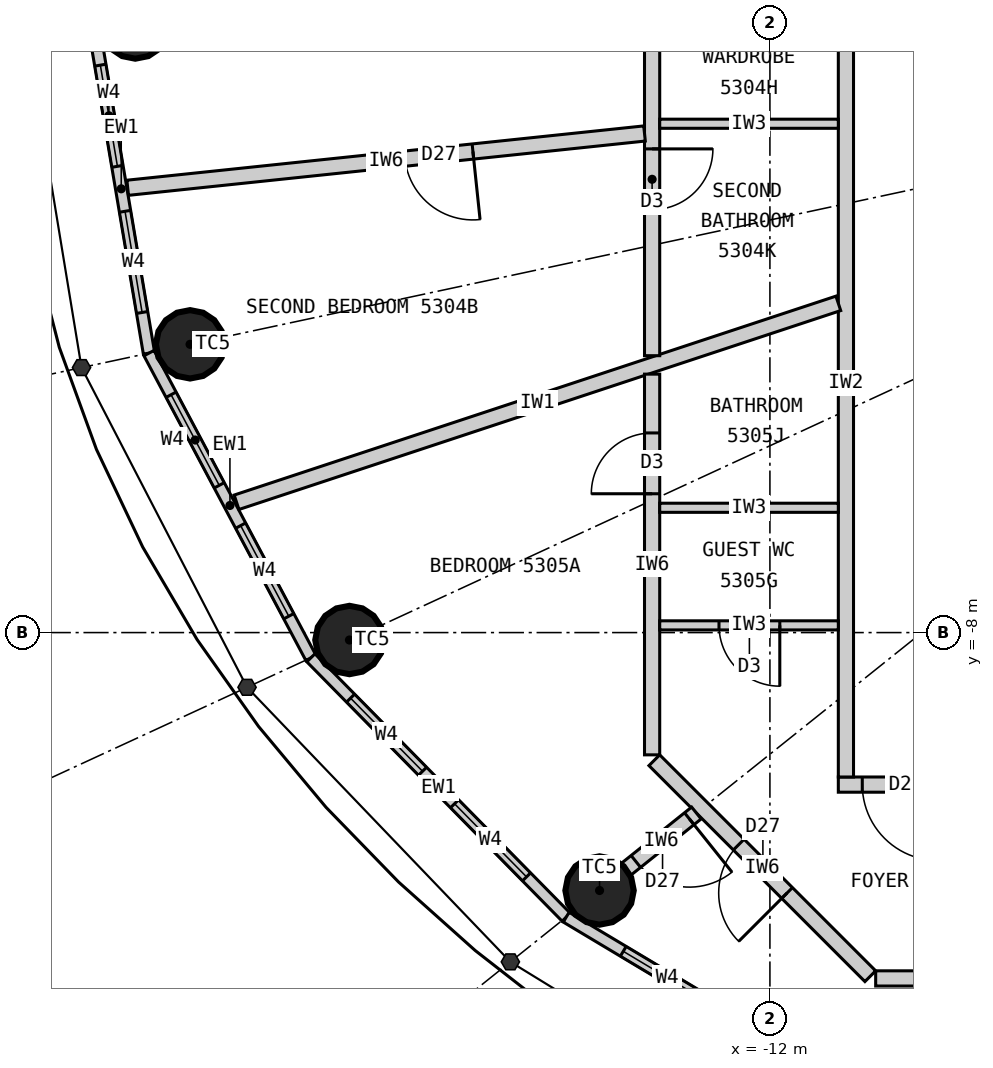
"""IFC4 building model, lengths in metres.
Left out: names, types, materials, properties, quantities, classifications, styles, units other than length and angle.
Written with IfcOpenShell. Run it as: python <this file> out.ifc"""

import sys

from ifc_helpers import new_model, si_unit, direction, frame, frame_2d, origin, origin_2d, place, context, subcontext, project, spatial, rectangle, circle, extrude, element, fill, save


model = new_model("IFC4")
c1 = context("Model", 3, precision=1e-05, world=origin(), true_north=direction((0.0, 1.0)))
c2 = subcontext(c1, "Body", "Model", "MODEL_VIEW")
j1 = project(units=[si_unit("LENGTHUNIT", "METRE"), si_unit("PLANEANGLEUNIT", "RADIAN")], contexts=[c1])
p1 = place(None, origin())
s1 = spatial("IfcSite", under=j1, at=p1, CompositionType="ELEMENT")
p2 = place(p1, origin())
s2 = spatial("IfcBuilding", under=s1, at=p2, CompositionType="ELEMENT")
p3 = place(p2, frame((0.0, 0.0, 199.5)))
s3 = spatial("IfcBuildingStorey", under=s2, at=p3, CompositionType="ELEMENT", Elevation=199.5)
for number, where, z_axis, x_axis in (
    (1, (-20.35, 0.0, 0.0), (0.0, 0.0, 1.0), (1.0, 0.0, 0.0)),
    (2, (-19.629, -4.208, 0.0), (0.0, 0.0, 1.0), (1.0, 0.0, 0.0)),
    (3, (-17.532, -8.098, 0.0), (0.0, 0.0, 1.0), (1.0, 0.0, 0.0)),
    (4, (-14.241, -11.393, 0.0), (0.0, 0.0, 1.0), (1.0, 0.0, 0.0)),
):
    element("IfcColumn", number, at=place(p3, frame(where, z_axis=z_axis, x_axis=x_axis)), inside=s3, PredefinedType="COLUMN", context=c2, shape_type="SweptSolid", body=[
        extrude(circle(Radius=0.45, at=origin_2d()), origin(), (0.0, 0.0, 1.0), 3.3),
    ])
p4 = place(p3, frame((-20.9, 0.0, 0.0), z_axis=(0.0, 0.0, 1.0), x_axis=(0.166538513568, -0.986034950445, 0.0)))
e5 = element("IfcWall", 5, at=p4, inside=s3, PredefinedType="ELEMENTEDWALL", context=c2, shape_type="SweptSolid", body=[
    extrude(rectangle(XDim=4.385, YDim=0.15, at=frame_2d((2.192, 0.0))), origin(), (0.0, 0.0, 1.0), 3.12),
])
p5 = place(p4, frame((0.542, 0.0, 0.9)))
e6 = element("IfcOpeningElement", 6, at=p5, cuts=e5, PredefinedType="OPENING", context=c2, shape_type="SweptSolid", body=[
    extrude(rectangle(XDim=1.35, YDim=1.9, at=frame_2d((0.675, 0.95))), frame((0.0, 0.085, 0.0), z_axis=(0.0, -1.0, 0.0), x_axis=(1.0, 0.0, 0.0)), (0.0, 0.0, 1.0), 0.17),
])
p6 = place(p4, frame((2.492, 0.0, 0.9)))
e7 = element("IfcOpeningElement", 7, at=p6, cuts=e5, PredefinedType="OPENING", context=c2, shape_type="SweptSolid", body=[
    extrude(rectangle(XDim=1.35, YDim=1.9, at=frame_2d((0.675, 0.95))), frame((0.0, 0.085, 0.0), z_axis=(0.0, -1.0, 0.0), x_axis=(1.0, 0.0, 0.0)), (0.0, 0.0, 1.0), 0.17),
])
p7 = place(p3, frame((-20.17, -4.323, 0.0), z_axis=(0.0, 0.0, 1.0), x_axis=(0.469256152955, -0.883062094597, 0.0)))
e8 = element("IfcWall", 8, at=p7, inside=s3, PredefinedType="ELEMENTEDWALL", context=c2, shape_type="SweptSolid", body=[
    extrude(rectangle(XDim=4.539, YDim=0.15, at=frame_2d((2.27, 0.0))), origin(), (0.0, 0.0, 1.0), 3.12),
])
p8 = place(p7, frame((0.62, 0.0, 0.9)))
e9 = element("IfcOpeningElement", 9, at=p8, cuts=e8, PredefinedType="OPENING", context=c2, shape_type="SweptSolid", body=[
    extrude(rectangle(XDim=1.35, YDim=1.9, at=frame_2d((0.675, 0.95))), frame((0.0, 0.085, 0.0), z_axis=(0.0, -1.0, 0.0), x_axis=(1.0, 0.0, 0.0)), (0.0, 0.0, 1.0), 0.17),
])
p9 = place(p7, frame((2.57, 0.0, 0.9)))
e10 = element("IfcOpeningElement", 10, at=p9, cuts=e8, PredefinedType="OPENING", context=c2, shape_type="SweptSolid", body=[
    extrude(rectangle(XDim=1.35, YDim=1.9, at=frame_2d((0.675, 0.95))), frame((0.0, 0.085, 0.0), z_axis=(0.0, -1.0, 0.0), x_axis=(1.0, 0.0, 0.0)), (0.0, 0.0, 1.0), 0.17),
])
p10 = place(p3, frame((-18.04, -8.332, 0.0), z_axis=(0.0, 0.0, 1.0), x_axis=(0.701527379618, -0.712642501993, 0.0)))
e11 = element("IfcWall", 11, at=p10, inside=s3, PredefinedType="ELEMENTEDWALL", context=c2, shape_type="SweptSolid", body=[
    extrude(rectangle(XDim=4.788, YDim=0.15, at=frame_2d((2.394, 0.0))), origin(), (0.0, 0.0, 1.0), 3.12),
])
p11 = place(p10, frame((0.744, 0.0, 0.9)))
e12 = element("IfcOpeningElement", 12, at=p11, cuts=e11, PredefinedType="OPENING", context=c2, shape_type="SweptSolid", body=[
    extrude(rectangle(XDim=1.35, YDim=1.9, at=frame_2d((0.675, 0.95))), frame((0.0, 0.085, 0.0), z_axis=(0.0, -1.0, 0.0), x_axis=(1.0, 0.0, 0.0)), (0.0, 0.0, 1.0), 0.17),
])
p12 = place(p10, frame((2.694, 0.0, 0.9)))
e13 = element("IfcOpeningElement", 13, at=p12, cuts=e11, PredefinedType="OPENING", context=c2, shape_type="SweptSolid", body=[
    extrude(rectangle(XDim=1.35, YDim=1.9, at=frame_2d((0.675, 0.95))), frame((0.0, 0.085, 0.0), z_axis=(0.0, -1.0, 0.0), x_axis=(1.0, 0.0, 0.0)), (0.0, 0.0, 1.0), 0.17),
])
p13 = place(p3, frame((-14.68, -11.744, 0.0), z_axis=(0.0, 0.0, 1.0), x_axis=(0.85822150553, -0.513279502265, 0.0)))
e14 = element("IfcWall", 14, at=p13, inside=s3, PredefinedType="ELEMENTEDWALL", context=c2, shape_type="SweptSolid", body=[
    extrude(rectangle(XDim=5.05, YDim=0.15, at=frame_2d((2.525, 0.0))), origin(), (0.0, 0.0, 1.0), 3.12),
])
p14 = place(p13, frame((0.875, 0.0, 0.9)))
e15 = element("IfcOpeningElement", 15, at=p14, cuts=e14, PredefinedType="OPENING", context=c2, shape_type="SweptSolid", body=[
    extrude(rectangle(XDim=1.35, YDim=1.9, at=frame_2d((0.675, 0.95))), frame((0.0, 0.085, 0.0), z_axis=(0.0, -1.0, 0.0), x_axis=(1.0, 0.0, 0.0)), (0.0, 0.0, 1.0), 0.17),
])
p15 = place(p13, frame((2.825, 0.0, 0.9)))
e16 = element("IfcOpeningElement", 16, at=p15, cuts=e14, PredefinedType="OPENING", context=c2, shape_type="SweptSolid", body=[
    extrude(rectangle(XDim=1.35, YDim=1.9, at=frame_2d((0.675, 0.95))), frame((0.0, 0.085, 0.0), z_axis=(0.0, -1.0, 0.0), x_axis=(1.0, 0.0, 0.0)), (0.0, 0.0, 1.0), 0.17),
])
p16 = place(p3, frame((-3.579, -10.0, 0.0), z_axis=(0.0, 0.0, 1.0), x_axis=(-1.0, 0.0, 0.0)))
e17 = element("IfcWall", 17, at=p16, inside=s3, PredefinedType="PARTITIONING", context=c2, shape_type="SweptSolid", body=[
    extrude(rectangle(XDim=7.521, YDim=0.2, at=frame_2d((3.761, 0.0))), origin(), (0.0, 0.0, 1.0), 3.12),
])
p17 = place(p16, frame((6.206, 0.0, 0.0)))
e18 = element("IfcOpeningElement", 18, at=p17, cuts=e17, PredefinedType="OPENING", context=c2, shape_type="SweptSolid", body=[
    extrude(rectangle(XDim=1.0, YDim=2.2, at=frame_2d((0.5, 1.1))), frame((0.0, 0.11, 0.0), z_axis=(0.0, -1.0, 0.0), x_axis=(1.0, 0.0, 0.0)), (0.0, 0.0, 1.0), 0.22),
])
p18 = place(p3, frame((-11.0, 0.464, 0.0), z_axis=(0.0, 0.0, 1.0), x_axis=(0.0, -1.0, 0.0)))
e19 = element("IfcWall", 19, at=p18, inside=s3, PredefinedType="PARTITIONING", context=c2, shape_type="SweptSolid", body=[
    extrude(rectangle(XDim=10.364, YDim=0.2, at=frame_2d((5.182, 0.0))), origin(), (0.0, 0.0, 1.0), 3.12),
])
p19 = place(p3, frame((-11.1, -3.669, 0.0), z_axis=(0.0, 0.0, 1.0), x_axis=(-0.949476668397, -0.313837627079, 0.0)))
e20 = element("IfcWall", 20, at=p19, inside=s3, PredefinedType="PARTITIONING", context=c2, shape_type="SweptSolid", body=[
    extrude(rectangle(XDim=8.339, YDim=0.2, at=frame_2d((4.169, 0.0))), origin(), (0.0, 0.0, 1.0), 3.12),
])
p20 = place(p3, frame((-13.55, 8.139, 0.0), z_axis=(0.0, 0.0, 1.0), x_axis=(0.0, -1.0, 0.0)))
e21 = element("IfcWall", 21, at=p20, inside=s3, PredefinedType="PARTITIONING", context=c2, shape_type="SweptSolid", body=[
    extrude(rectangle(XDim=12.496, YDim=0.2, at=frame_2d((6.248, 0.0))), origin(), (0.0, 0.0, 1.0), 3.12),
])
p21 = place(p20, frame((2.42, 0.0, 0.0)))
e22 = element("IfcOpeningElement", 22, at=p21, cuts=e21, PredefinedType="OPENING", context=c2, shape_type="SweptSolid", body=[
    extrude(rectangle(XDim=0.8, YDim=2.1, at=frame_2d((0.4, 1.05))), frame((0.0, 0.11, 0.0), z_axis=(0.0, -1.0, 0.0), x_axis=(1.0, 0.0, 0.0)), (0.0, 0.0, 1.0), 0.22),
])
p22 = place(p20, frame((9.776, 0.0, 0.0)))
e23 = element("IfcOpeningElement", 23, at=p22, cuts=e21, PredefinedType="OPENING", context=c2, shape_type="SweptSolid", body=[
    extrude(rectangle(XDim=0.8, YDim=2.1, at=frame_2d((0.4, 1.05))), frame((0.0, 0.11, 0.0), z_axis=(0.0, -1.0, 0.0), x_axis=(1.0, 0.0, 0.0)), (0.0, 0.0, 1.0), 0.22),
])
p23 = place(p20, frame((5.82, 0.0, 0.0)))
e24 = element("IfcOpeningElement", 24, at=p23, cuts=e21, PredefinedType="OPENING", context=c2, shape_type="SweptSolid", body=[
    extrude(rectangle(XDim=0.9, YDim=2.1, at=frame_2d((0.45, 1.05))), frame((0.0, 0.11, 0.0), z_axis=(0.0, -1.0, 0.0), x_axis=(1.0, 0.0, 0.0)), (0.0, 0.0, 1.0), 0.22),
])
p24 = place(p3, frame((-13.65, -1.434, 0.0), z_axis=(0.0, 0.0, 1.0), x_axis=(-0.994526954268, -0.10448031984, 0.0)))
e25 = element("IfcWall", 25, at=p24, inside=s3, PredefinedType="PARTITIONING", context=c2, shape_type="SweptSolid", body=[
    extrude(rectangle(XDim=6.837, YDim=0.2, at=frame_2d((3.418, 0.0))), origin(), (0.0, 0.0, 1.0), 2.47),
])
p25 = place(p24, frame((2.27, 0.0, 0.0)))
e26 = element("IfcOpeningElement", 26, at=p25, cuts=e25, PredefinedType="OPENING", context=c2, shape_type="SweptSolid", body=[
    extrude(rectangle(XDim=0.9, YDim=2.1, at=frame_2d((0.45, 1.05))), frame((0.0, 0.11, 0.0), z_axis=(0.0, -1.0, 0.0), x_axis=(1.0, 0.0, 0.0)), (0.0, 0.0, 1.0), 0.22),
])
p26 = place(p3, frame((-11.1, -1.306, 0.0), z_axis=(0.0, 0.0, 1.0), x_axis=(-1.0, 0.0, 0.0)))
e27 = element("IfcWall", 27, at=p26, inside=s3, PredefinedType="PARTITIONING", context=c2, shape_type="SweptSolid", body=[
    extrude(rectangle(XDim=2.35, YDim=0.12, at=frame_2d((1.175, 0.0))), origin(), (0.0, 0.0, 1.0), 3.12),
])
p27 = place(p3, frame((-13.55, -4.6, 0.0), z_axis=(0.0, 0.0, 1.0), x_axis=(0.0, -1.0, 0.0)))
e28 = element("IfcWall", 28, at=p27, inside=s3, PredefinedType="PARTITIONING", context=c2, shape_type="SweptSolid", body=[
    extrude(rectangle(XDim=5.009, YDim=0.2, at=frame_2d((2.504, 0.0))), origin(), (0.0, 0.0, 1.0), 3.12),
])
p28 = place(p27, frame((0.774, 0.0, 0.0)))
e29 = element("IfcOpeningElement", 29, at=p28, cuts=e28, PredefinedType="OPENING", context=c2, shape_type="SweptSolid", body=[
    extrude(rectangle(XDim=0.8, YDim=2.1, at=frame_2d((0.4, 1.05))), frame((0.0, 0.11, 0.0), z_axis=(0.0, -1.0, 0.0), x_axis=(1.0, 0.0, 0.0)), (0.0, 0.0, 1.0), 0.22),
])
p29 = place(p3, frame((-13.521, -9.679, 0.0), z_axis=(0.0, 0.0, 1.0), x_axis=(0.707106781187, -0.707106781187, 0.0)))
e30 = element("IfcWall", 30, at=p29, inside=s3, PredefinedType="PARTITIONING", context=c2, shape_type="SweptSolid", body=[
    extrude(rectangle(XDim=4.019, YDim=0.2, at=frame_2d((2.009, 0.0))), origin(), (0.0, 0.0, 1.0), 3.12),
])
p30 = place(p29, frame((1.57, 0.0, 0.0)))
e31 = element("IfcOpeningElement", 31, at=p30, cuts=e30, PredefinedType="OPENING", context=c2, shape_type="SweptSolid", body=[
    extrude(rectangle(XDim=0.9, YDim=2.1, at=frame_2d((0.45, 1.05))), frame((0.0, 0.11, 0.0), z_axis=(0.0, -1.0, 0.0), x_axis=(1.0, 0.0, 0.0)), (0.0, 0.0, 1.0), 0.22),
])
p31 = place(p3, frame((-10.609, -12.55, 0.0), z_axis=(0.0, 0.0, 1.0), x_axis=(1.0, 0.0, 0.0)))
e32 = element("IfcWall", 32, at=p31, inside=s3, PredefinedType="PARTITIONING", context=c2, shape_type="SweptSolid", body=[
    extrude(rectangle(XDim=3.947, YDim=0.2, at=frame_2d((1.974, 0.0))), origin(), (0.0, 0.0, 1.0), 3.12),
])
p32 = place(p3, frame((-12.968, -10.374, 0.0), z_axis=(0.0, 0.0, 1.0), x_axis=(-0.780888968944, -0.624669847345, 0.0)))
e33 = element("IfcWall", 33, at=p32, inside=s3, PredefinedType="PARTITIONING", context=c2, shape_type="SweptSolid", body=[
    extrude(rectangle(XDim=1.181, YDim=0.2, at=frame_2d((0.591, 0.0))), origin(), (0.0, 0.0, 1.0), 2.42),
])
p33 = place(p32, frame((0.12, 0.0, 0.0)))
e34 = element("IfcOpeningElement", 34, at=p33, cuts=e33, PredefinedType="OPENING", context=c2, shape_type="SweptSolid", body=[
    extrude(rectangle(XDim=0.9, YDim=2.1, at=frame_2d((0.45, 1.05))), frame((0.0, 0.11, 0.0), z_axis=(0.0, -1.0, 0.0), x_axis=(1.0, 0.0, 0.0)), (0.0, 0.0, 1.0), 0.22),
])
p34 = place(p3, frame((-11.1, -6.358, 0.0), z_axis=(0.0, 0.0, 1.0), x_axis=(-1.0, 0.0, 0.0)))
e35 = element("IfcWall", 35, at=p34, inside=s3, PredefinedType="PARTITIONING", context=c2, shape_type="SweptSolid", body=[
    extrude(rectangle(XDim=2.35, YDim=0.12, at=frame_2d((1.175, 0.0))), origin(), (0.0, 0.0, 1.0), 3.12),
])
p35 = place(p3, frame((-11.1, -7.905, 0.0), z_axis=(0.0, 0.0, 1.0), x_axis=(-1.0, 0.0, 0.0)))
e36 = element("IfcWall", 36, at=p35, inside=s3, PredefinedType="PARTITIONING", context=c2, shape_type="SweptSolid", body=[
    extrude(rectangle(XDim=2.35, YDim=0.12, at=frame_2d((1.175, 0.0))), origin(), (0.0, 0.0, 1.0), 3.12),
])
p36 = place(p35, frame((0.77, 0.0, 0.0)))
e37 = element("IfcOpeningElement", 37, at=p36, cuts=e36, PredefinedType="OPENING", context=c2, shape_type="SweptSolid", body=[
    extrude(rectangle(XDim=0.8, YDim=2.1, at=frame_2d((0.4, 1.05))), frame((0.0, 0.07, 0.0), z_axis=(0.0, -1.0, 0.0), x_axis=(1.0, 0.0, 0.0)), (0.0, 0.0, 1.0), 0.14),
])
p37 = place(p5, origin())
e38 = element("IfcWindow", 38, at=p37, inside=s3, PartitioningType="SINGLE_PANEL", PredefinedType="WINDOW", context=c2, shape_type="SweptSolid", body=[
    extrude(rectangle(XDim=1.35, YDim=1.9, at=frame_2d((0.675, 0.95))), frame((0.0, 0.03, 0.0), z_axis=(0.0, -1.0, 0.0), x_axis=(1.0, 0.0, 0.0)), (0.0, 0.0, 1.0), 0.06),
])
fill(e6, e38)
p38 = place(p6, origin())
e39 = element("IfcWindow", 39, at=p38, inside=s3, PartitioningType="SINGLE_PANEL", PredefinedType="WINDOW", context=c2, shape_type="SweptSolid", body=[
    extrude(rectangle(XDim=1.35, YDim=1.9, at=frame_2d((0.675, 0.95))), frame((0.0, 0.03, 0.0), z_axis=(0.0, -1.0, 0.0), x_axis=(1.0, 0.0, 0.0)), (0.0, 0.0, 1.0), 0.06),
])
fill(e7, e39)
p39 = place(p8, origin())
e40 = element("IfcWindow", 40, at=p39, inside=s3, PartitioningType="SINGLE_PANEL", PredefinedType="WINDOW", context=c2, shape_type="SweptSolid", body=[
    extrude(rectangle(XDim=1.35, YDim=1.9, at=frame_2d((0.675, 0.95))), frame((0.0, 0.03, 0.0), z_axis=(0.0, -1.0, 0.0), x_axis=(1.0, 0.0, 0.0)), (0.0, 0.0, 1.0), 0.06),
])
fill(e9, e40)
p40 = place(p9, origin())
e41 = element("IfcWindow", 41, at=p40, inside=s3, PartitioningType="SINGLE_PANEL", PredefinedType="WINDOW", context=c2, shape_type="SweptSolid", body=[
    extrude(rectangle(XDim=1.35, YDim=1.9, at=frame_2d((0.675, 0.95))), frame((0.0, 0.03, 0.0), z_axis=(0.0, -1.0, 0.0), x_axis=(1.0, 0.0, 0.0)), (0.0, 0.0, 1.0), 0.06),
])
fill(e10, e41)
p41 = place(p11, origin())
e42 = element("IfcWindow", 42, at=p41, inside=s3, PartitioningType="SINGLE_PANEL", PredefinedType="WINDOW", context=c2, shape_type="SweptSolid", body=[
    extrude(rectangle(XDim=1.35, YDim=1.9, at=frame_2d((0.675, 0.95))), frame((0.0, 0.03, 0.0), z_axis=(0.0, -1.0, 0.0), x_axis=(1.0, 0.0, 0.0)), (0.0, 0.0, 1.0), 0.06),
])
fill(e12, e42)
p42 = place(p12, origin())
e43 = element("IfcWindow", 43, at=p42, inside=s3, PartitioningType="SINGLE_PANEL", PredefinedType="WINDOW", context=c2, shape_type="SweptSolid", body=[
    extrude(rectangle(XDim=1.35, YDim=1.9, at=frame_2d((0.675, 0.95))), frame((0.0, 0.03, 0.0), z_axis=(0.0, -1.0, 0.0), x_axis=(1.0, 0.0, 0.0)), (0.0, 0.0, 1.0), 0.06),
])
fill(e13, e43)
p43 = place(p14, origin())
e44 = element("IfcWindow", 44, at=p43, inside=s3, PartitioningType="SINGLE_PANEL", PredefinedType="WINDOW", context=c2, shape_type="SweptSolid", body=[
    extrude(rectangle(XDim=1.35, YDim=1.9, at=frame_2d((0.675, 0.95))), frame((0.0, 0.03, 0.0), z_axis=(0.0, -1.0, 0.0), x_axis=(1.0, 0.0, 0.0)), (0.0, 0.0, 1.0), 0.06),
])
fill(e15, e44)
p44 = place(p22, origin())
e45 = element("IfcDoor", 45, at=p44, inside=s3, OperationType="SINGLE_SWING_LEFT", PredefinedType="DOOR", context=c2, shape_type="SweptSolid", body=[
    extrude(rectangle(XDim=0.8, YDim=2.1, at=frame_2d((0.4, 1.05))), frame((0.0, 0.025, 0.0), z_axis=(0.0, -1.0, 0.0), x_axis=(1.0, 0.0, 0.0)), (0.0, 0.0, 1.0), 0.05),
])
fill(e23, e45)
p45 = place(p25, origin())
e46 = element("IfcDoor", 46, at=p45, inside=s3, OperationType="SINGLE_SWING_LEFT", PredefinedType="DOOR", context=c2, shape_type="SweptSolid", body=[
    extrude(rectangle(XDim=0.9, YDim=2.1, at=frame_2d((0.45, 1.05))), frame((0.0, 0.025, 0.0), z_axis=(0.0, -1.0, 0.0), x_axis=(1.0, 0.0, 0.0)), (0.0, 0.0, 1.0), 0.05),
])
fill(e26, e46)
p46 = place(p17, origin())
e47 = element("IfcDoor", 47, at=p46, inside=s3, OperationType="SINGLE_SWING_LEFT", PredefinedType="DOOR", context=c2, shape_type="SweptSolid", body=[
    extrude(rectangle(XDim=1.0, YDim=2.2, at=frame_2d((0.5, 1.1))), frame((0.0, 0.025, 0.0), z_axis=(0.0, -1.0, 0.0), x_axis=(1.0, 0.0, 0.0)), (0.0, 0.0, 1.0), 0.05),
])
fill(e18, e47)
p47 = place(p28, origin())
e48 = element("IfcDoor", 48, at=p47, inside=s3, OperationType="SINGLE_SWING_RIGHT", PredefinedType="DOOR", context=c2, shape_type="SweptSolid", body=[
    extrude(rectangle(XDim=0.8, YDim=2.1, at=frame_2d((0.4, 1.05))), frame((0.0, 0.025, 0.0), z_axis=(0.0, -1.0, 0.0), x_axis=(1.0, 0.0, 0.0)), (0.0, 0.0, 1.0), 0.05),
])
fill(e29, e48)
p48 = place(p36, origin())
e49 = element("IfcDoor", 49, at=p48, inside=s3, OperationType="SINGLE_SWING_LEFT", PredefinedType="DOOR", context=c2, shape_type="SweptSolid", body=[
    extrude(rectangle(XDim=0.8, YDim=2.1, at=frame_2d((0.4, 1.05))), frame((0.0, 0.025, 0.0), z_axis=(0.0, -1.0, 0.0), x_axis=(1.0, 0.0, 0.0)), (0.0, 0.0, 1.0), 0.05),
])
fill(e37, e49)
p49 = place(p30, origin())
e50 = element("IfcDoor", 50, at=p49, inside=s3, OperationType="SINGLE_SWING_RIGHT", PredefinedType="DOOR", context=c2, shape_type="SweptSolid", body=[
    extrude(rectangle(XDim=0.9, YDim=2.1, at=frame_2d((0.45, 1.05))), frame((0.0, 0.025, 0.0), z_axis=(0.0, -1.0, 0.0), x_axis=(1.0, 0.0, 0.0)), (0.0, 0.0, 1.0), 0.05),
])
fill(e31, e50)
p50 = place(p33, origin())
e51 = element("IfcDoor", 51, at=p50, inside=s3, OperationType="SINGLE_SWING_LEFT", PredefinedType="DOOR", context=c2, shape_type="SweptSolid", body=[
    extrude(rectangle(XDim=0.9, YDim=2.1, at=frame_2d((0.45, 1.05))), frame((0.0, 0.025, 0.0), z_axis=(0.0, -1.0, 0.0), x_axis=(1.0, 0.0, 0.0)), (0.0, 0.0, 1.0), 0.05),
])
fill(e34, e51)
save(model, sys.argv[1])
